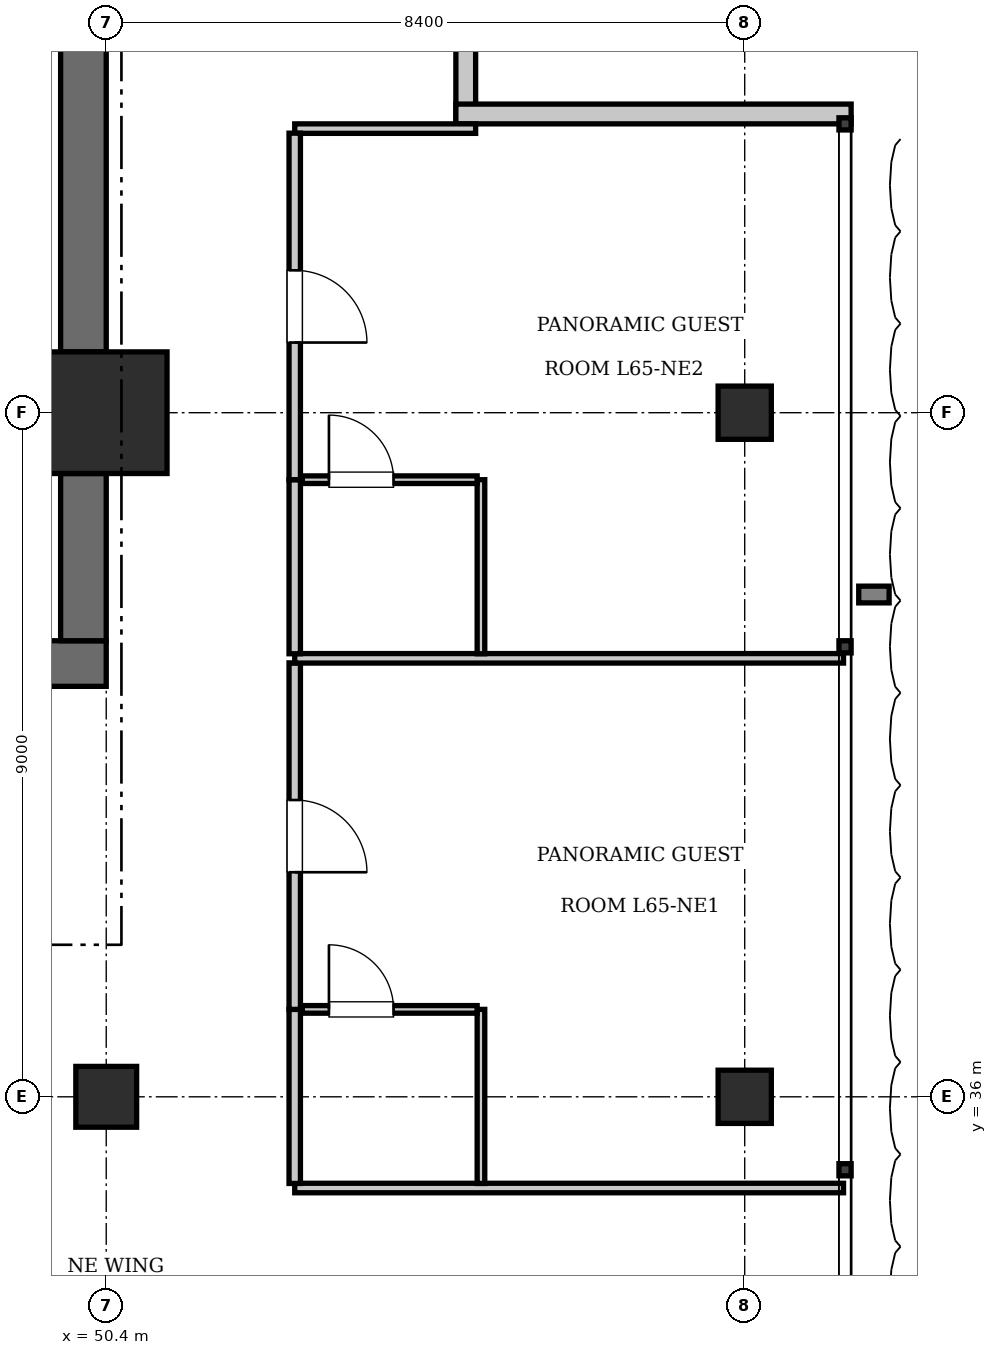
"""IFC4 building model, lengths in metres.
Left out: names, types, materials, properties, quantities, classifications, styles, units other than length and angle.
Written with IfcOpenShell. Run it as: python <this file> out.ifc"""

import sys

from ifc_helpers import new_model, si_unit, direction, frame, frame_2d, origin, origin_2d, place, context, subcontext, project, spatial, rectangle, extrude, element, fill, save


model = new_model("IFC4")
c1 = context("Model", 3, precision=1e-05, world=origin(), true_north=direction((0.0, 1.0)))
c2 = subcontext(c1, "Body", "Model", "MODEL_VIEW")
j1 = project(units=[si_unit("LENGTHUNIT", "METRE"), si_unit("PLANEANGLEUNIT", "RADIAN")], contexts=[c1])
p1 = place(None, origin())
s1 = spatial("IfcSite", under=j1, at=p1, CompositionType="ELEMENT")
p2 = place(p1, origin())
s2 = spatial("IfcBuilding", under=s1, at=p2, CompositionType="ELEMENT")
p3 = place(p2, frame((0.0, 0.0, 266.35)))
s3 = spatial("IfcBuildingStorey", under=s2, at=p3, CompositionType="ELEMENT", Elevation=266.35)
p4 = place(p3, frame((50.4, 45.0, 0.0), z_axis=(0.0, 0.0, 1.0), x_axis=(1.0, 0.0, 0.0)))
e1 = element("IfcColumn", 1, at=p4, inside=s3, PredefinedType="COLUMN", context=c2, shape_type="SweptSolid", body=[
    extrude(rectangle(XDim=1.6, YDim=1.6, at=origin_2d()), origin(), (0.0, 0.0, 1.0), 3.85),
])
p5 = place(p3, frame((43.6, 41.7, 0.0), z_axis=(0.0, 0.0, 1.0), x_axis=(1.0, 0.0, 0.0)))
e2 = element("IfcWall", 2, at=p5, inside=s3, PredefinedType="SHEAR", context=c2, shape_type="SweptSolid", body=[
    extrude(rectangle(XDim=6.8, YDim=0.6, at=frame_2d((3.4, 0.0))), origin(), (0.0, 0.0, 1.0), 3.85),
])
p6 = place(p5, frame((3.9, 0.0, 0.0)))
e3 = element("IfcOpeningElement", 3, at=p6, cuts=e2, PredefinedType="OPENING", context=c2, shape_type="SweptSolid", body=[
    extrude(rectangle(XDim=1.15, YDim=2.15, at=frame_2d((0.575, 1.075))), frame((0.0, 0.31, 0.0), z_axis=(0.0, -1.0, 0.0), x_axis=(1.0, 0.0, 0.0)), (0.0, 0.0, 1.0), 0.62),
])
p7 = place(p5, frame((0.55, 0.0, 0.0)))
e4 = element("IfcOpeningElement", 4, at=p7, cuts=e2, PredefinedType="OPENING", context=c2, shape_type="SweptSolid", body=[
    extrude(rectangle(XDim=1.1, YDim=2.2, at=frame_2d((0.55, 1.1))), frame((0.0, 0.31, 0.0), z_axis=(0.0, -1.0, 0.0), x_axis=(1.0, 0.0, 0.0)), (0.0, 0.0, 1.0), 0.62),
])
p8 = place(p3, frame((50.1, 42.0, 0.0), z_axis=(0.0, 0.0, 1.0), x_axis=(0.0, 1.0, 0.0)))
e5 = element("IfcWall", 5, at=p8, inside=s3, PredefinedType="SHEAR", context=c2, shape_type="SweptSolid", body=[
    extrude(rectangle(XDim=2.2, YDim=0.6, at=frame_2d((1.1, 0.0))), origin(), (0.0, 0.0, 1.0), 3.85),
])
p9 = place(p3, frame((50.1, 45.8, 0.0), z_axis=(0.0, 0.0, 1.0), x_axis=(0.0, 1.0, 0.0)))
e6 = element("IfcWall", 6, at=p9, inside=s3, PredefinedType="SHEAR", context=c2, shape_type="SweptSolid", body=[
    extrude(rectangle(XDim=7.6, YDim=0.6, at=frame_2d((3.8, 0.0))), origin(), (0.0, 0.0, 1.0), 3.85),
])
p10 = place(p3, frame((50.4, 36.0, 0.0), z_axis=(0.0, 0.0, 1.0), x_axis=(1.0, 0.0, 0.0)))
e7 = element("IfcColumn", 7, at=p10, inside=s3, PredefinedType="COLUMN", context=c2, shape_type="SweptSolid", body=[
    extrude(rectangle(XDim=0.8, YDim=0.8, at=origin_2d()), origin(), (0.0, 0.0, 1.0), 3.85),
])
for number, where, z_axis, x_axis in (
    (8, (58.8, 36.0, 0.0), (0.0, 0.0, 1.0), (1.0, 0.0, 0.0)),
    (9, (58.8, 45.0, 0.0), (0.0, 0.0, 1.0), (1.0, 0.0, 0.0)),
):
    element("IfcColumn", number, at=place(p3, frame(where, z_axis=z_axis, x_axis=x_axis)), inside=s3, PredefinedType="COLUMN", context=c2, shape_type="SweptSolid", body=[
        extrude(rectangle(XDim=0.7, YDim=0.7, at=origin_2d()), origin(), (0.0, 0.0, 1.0), 3.85),
    ])
for number, where, z_axis, x_axis in (
    (10, (55.13, 54.0, 0.0), (0.0, 0.0, 1.0), (0.0, -1.0, 0.0)),
    (11, (55.0, 48.93, 0.0), (0.0, 0.0, 1.0), (1.0, 0.0, 0.0)),
):
    element("IfcWall", number, at=place(p3, frame(where, z_axis=z_axis, x_axis=x_axis)), inside=s3, PredefinedType="SOLIDWALL", context=c2, shape_type="SweptSolid", body=[
        extrude(rectangle(XDim=5.2, YDim=0.26, at=frame_2d((2.6, 0.0))), origin(), (0.0, 0.0, 1.0), 3.61),
    ])
p11 = place(p3, frame((52.88, 34.8, 0.0), z_axis=(0.0, 0.0, 1.0), x_axis=(1.0, 0.0, 0.0)))
e12 = element("IfcWall", 12, at=p11, inside=s3, PredefinedType="PARTITIONING", context=c2, shape_type="SweptSolid", body=[
    extrude(rectangle(XDim=7.22, YDim=0.125, at=frame_2d((3.61, 0.0))), origin(), (0.0, 0.0, 1.0), 3.61),
])
p12 = place(p3, frame((52.88, 48.738, 0.0), z_axis=(0.0, 0.0, 1.0), x_axis=(1.0, 0.0, 0.0)))
e13 = element("IfcWall", 13, at=p12, inside=s3, PredefinedType="PARTITIONING", context=c2, shape_type="SweptSolid", body=[
    extrude(rectangle(XDim=2.38, YDim=0.125, at=frame_2d((1.19, 0.0))), origin(), (0.0, 0.0, 1.0), 3.61),
])
p13 = place(p3, frame((52.88, 34.86, 0.0), z_axis=(0.0, 0.0, 1.0), x_axis=(0.0, 1.0, 0.0)))
e14 = element("IfcWall", 14, at=p13, inside=s3, PredefinedType="PARTITIONING", context=c2, shape_type="SweptSolid", body=[
    extrude(rectangle(XDim=2.29, YDim=0.15, at=frame_2d((1.145, 0.0))), origin(), (0.0, 0.0, 1.0), 3.61),
])
p14 = place(p3, frame((52.88, 37.15, 0.0), z_axis=(0.0, 0.0, 1.0), x_axis=(0.0, 1.0, 0.0)))
e15 = element("IfcWall", 15, at=p14, inside=s3, PredefinedType="PARTITIONING", context=c2, shape_type="SweptSolid", body=[
    extrude(rectangle(XDim=4.559, YDim=0.15, at=frame_2d((2.279, 0.0))), origin(), (0.0, 0.0, 1.0), 3.61),
])
p15 = place(p14, frame((1.804, 0.0, 0.0)))
e16 = element("IfcOpeningElement", 16, at=p15, cuts=e15, PredefinedType="OPENING", context=c2, shape_type="SweptSolid", body=[
    extrude(rectangle(XDim=0.95, YDim=2.15, at=frame_2d((0.475, 1.075))), frame((0.0, 0.085, 0.0), z_axis=(0.0, -1.0, 0.0), x_axis=(1.0, 0.0, 0.0)), (0.0, 0.0, 1.0), 0.17),
])
p16 = place(p3, frame((55.33, 34.86, 0.0), z_axis=(0.0, 0.0, 1.0), x_axis=(0.0, 1.0, 0.0)))
e17 = element("IfcWall", 17, at=p16, inside=s3, PredefinedType="PARTITIONING", context=c2, shape_type="SweptSolid", body=[
    extrude(rectangle(XDim=2.29, YDim=0.1, at=frame_2d((1.145, 0.0))), origin(), (0.0, 0.0, 1.0), 3.61),
])
p17 = place(p3, frame((52.98, 37.15, 0.0), z_axis=(0.0, 0.0, 1.0), x_axis=(1.0, 0.0, 0.0)))
e18 = element("IfcWall", 18, at=p17, inside=s3, PredefinedType="PARTITIONING", context=c2, shape_type="SweptSolid", body=[
    extrude(rectangle(XDim=2.3, YDim=0.1, at=frame_2d((1.15, 0.0))), origin(), (0.0, 0.0, 1.0), 3.61),
])
p18 = place(p17, frame((0.35, 0.0, 0.0)))
e19 = element("IfcOpeningElement", 19, at=p18, cuts=e18, PredefinedType="OPENING", context=c2, shape_type="SweptSolid", body=[
    extrude(rectangle(XDim=0.85, YDim=2.1, at=frame_2d((0.425, 1.05))), frame((0.0, 0.06, 0.0), z_axis=(0.0, -1.0, 0.0), x_axis=(1.0, 0.0, 0.0)), (0.0, 0.0, 1.0), 0.12),
])
p19 = place(p3, frame((52.88, 41.769, 0.0), z_axis=(0.0, 0.0, 1.0), x_axis=(1.0, 0.0, 0.0)))
e20 = element("IfcWall", 20, at=p19, inside=s3, PredefinedType="PARTITIONING", context=c2, shape_type="SweptSolid", body=[
    extrude(rectangle(XDim=7.22, YDim=0.125, at=frame_2d((3.61, 0.0))), origin(), (0.0, 0.0, 1.0), 3.61),
])
p20 = place(p3, frame((52.88, 41.829, 0.0), z_axis=(0.0, 0.0, 1.0), x_axis=(0.0, 1.0, 0.0)))
e21 = element("IfcWall", 21, at=p20, inside=s3, PredefinedType="PARTITIONING", context=c2, shape_type="SweptSolid", body=[
    extrude(rectangle(XDim=2.29, YDim=0.15, at=frame_2d((1.145, 0.0))), origin(), (0.0, 0.0, 1.0), 3.61),
])
p21 = place(p3, frame((52.88, 44.119, 0.0), z_axis=(0.0, 0.0, 1.0), x_axis=(0.0, 1.0, 0.0)))
e22 = element("IfcWall", 22, at=p21, inside=s3, PredefinedType="PARTITIONING", context=c2, shape_type="SweptSolid", body=[
    extrude(rectangle(XDim=4.559, YDim=0.15, at=frame_2d((2.279, 0.0))), origin(), (0.0, 0.0, 1.0), 3.61),
])
p22 = place(p21, frame((1.804, 0.0, 0.0)))
e23 = element("IfcOpeningElement", 23, at=p22, cuts=e22, PredefinedType="OPENING", context=c2, shape_type="SweptSolid", body=[
    extrude(rectangle(XDim=0.95, YDim=2.15, at=frame_2d((0.475, 1.075))), frame((0.0, 0.085, 0.0), z_axis=(0.0, -1.0, 0.0), x_axis=(1.0, 0.0, 0.0)), (0.0, 0.0, 1.0), 0.17),
])
p23 = place(p3, frame((55.33, 41.829, 0.0), z_axis=(0.0, 0.0, 1.0), x_axis=(0.0, 1.0, 0.0)))
e24 = element("IfcWall", 24, at=p23, inside=s3, PredefinedType="PARTITIONING", context=c2, shape_type="SweptSolid", body=[
    extrude(rectangle(XDim=2.29, YDim=0.1, at=frame_2d((1.145, 0.0))), origin(), (0.0, 0.0, 1.0), 3.61),
])
p24 = place(p3, frame((52.98, 44.119, 0.0), z_axis=(0.0, 0.0, 1.0), x_axis=(1.0, 0.0, 0.0)))
e25 = element("IfcWall", 25, at=p24, inside=s3, PredefinedType="PARTITIONING", context=c2, shape_type="SweptSolid", body=[
    extrude(rectangle(XDim=2.3, YDim=0.1, at=frame_2d((1.15, 0.0))), origin(), (0.0, 0.0, 1.0), 3.61),
])
p25 = place(p24, frame((0.35, 0.0, 0.0)))
e26 = element("IfcOpeningElement", 26, at=p25, cuts=e25, PredefinedType="OPENING", context=c2, shape_type="SweptSolid", body=[
    extrude(rectangle(XDim=0.85, YDim=2.1, at=frame_2d((0.425, 1.05))), frame((0.0, 0.06, 0.0), z_axis=(0.0, -1.0, 0.0), x_axis=(1.0, 0.0, 0.0)), (0.0, 0.0, 1.0), 0.12),
])
p26 = place(p18, origin())
e27 = element("IfcDoor", 27, at=p26, inside=s3, OperationType="SINGLE_SWING_LEFT", PredefinedType="DOOR", context=c2, shape_type="SweptSolid", body=[
    extrude(rectangle(XDim=0.85, YDim=2.1, at=frame_2d((0.425, 1.05))), frame((0.0, 0.025, 0.0), z_axis=(0.0, -1.0, 0.0), x_axis=(1.0, 0.0, 0.0)), (0.0, 0.0, 1.0), 0.05),
])
fill(e19, e27)
p27 = place(p15, frame((0.95, 0.0, 0.0), z_axis=(0.0, 0.0, 1.0), x_axis=(-1.0, 0.0, 0.0)))
e28 = element("IfcDoor", 28, at=p27, inside=s3, OperationType="SINGLE_SWING_RIGHT", PredefinedType="DOOR", context=c2, shape_type="SweptSolid", body=[
    extrude(rectangle(XDim=0.95, YDim=2.15, at=frame_2d((0.475, 1.075))), frame((0.0, 0.025, 0.0), z_axis=(0.0, -1.0, 0.0), x_axis=(1.0, 0.0, 0.0)), (0.0, 0.0, 1.0), 0.05),
])
fill(e16, e28)
p28 = place(p25, origin())
e29 = element("IfcDoor", 29, at=p28, inside=s3, OperationType="SINGLE_SWING_LEFT", PredefinedType="DOOR", context=c2, shape_type="SweptSolid", body=[
    extrude(rectangle(XDim=0.85, YDim=2.1, at=frame_2d((0.425, 1.05))), frame((0.0, 0.025, 0.0), z_axis=(0.0, -1.0, 0.0), x_axis=(1.0, 0.0, 0.0)), (0.0, 0.0, 1.0), 0.05),
])
fill(e26, e29)
p29 = place(p22, frame((0.95, 0.0, 0.0), z_axis=(0.0, 0.0, 1.0), x_axis=(-1.0, 0.0, 0.0)))
e30 = element("IfcDoor", 30, at=p29, inside=s3, OperationType="SINGLE_SWING_RIGHT", PredefinedType="DOOR", context=c2, shape_type="SweptSolid", body=[
    extrude(rectangle(XDim=0.95, YDim=2.15, at=frame_2d((0.475, 1.075))), frame((0.0, 0.025, 0.0), z_axis=(0.0, -1.0, 0.0), x_axis=(1.0, 0.0, 0.0)), (0.0, 0.0, 1.0), 0.05),
])
fill(e23, e30)
save(model, sys.argv[1])
